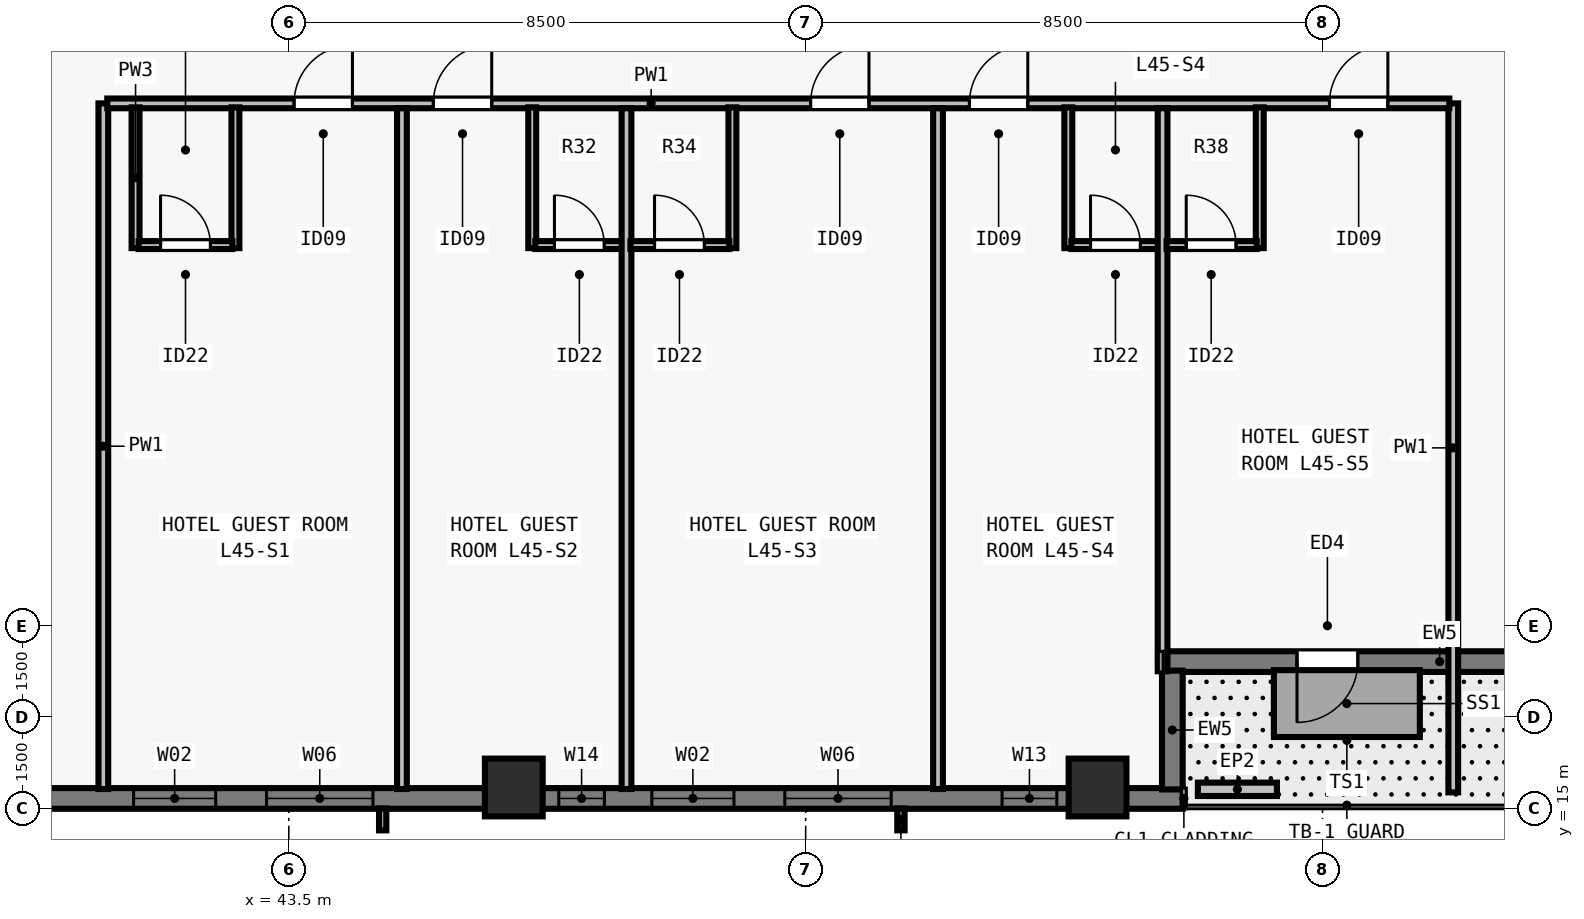
"""IFC4 building model, lengths in metres.
Left out: names, types, materials, properties, quantities, classifications, styles, units other than length and angle.
Written with IfcOpenShell. Run it as: python <this file> out.ifc"""

import sys

from ifc_helpers import new_model, si_unit, direction, frame, frame_2d, origin, origin_2d, place, context, subcontext, project, spatial, rectangle, extrude, element, fill, save


model = new_model("IFC4")
c1 = context("Model", 3, precision=1e-05, world=origin(), true_north=direction((0.0, 1.0)))
c2 = subcontext(c1, "Body", "Model", "MODEL_VIEW")
j1 = project(units=[si_unit("LENGTHUNIT", "METRE"), si_unit("PLANEANGLEUNIT", "RADIAN")], contexts=[c1])
p1 = place(None, origin())
s1 = spatial("IfcSite", under=j1, at=p1, CompositionType="ELEMENT")
p2 = place(p1, origin())
s2 = spatial("IfcBuilding", under=s1, at=p2, CompositionType="ELEMENT")
p3 = place(p2, frame((0.0, 0.0, 165.5)))
s3 = spatial("IfcBuildingStorey", under=s2, at=p3, CompositionType="ELEMENT", Elevation=165.5)
for number, where, z_axis, x_axis in (
    (1, (47.2, 15.35, 0.0), (0.0, 0.0, 1.0), (1.0, 0.0, 0.0)),
    (2, (56.8, 15.35, 0.0), (0.0, 0.0, 1.0), (1.0, 0.0, 0.0)),
):
    element("IfcColumn", number, at=place(p3, frame(where, z_axis=z_axis, x_axis=x_axis)), inside=s3, PredefinedType="COLUMN", context=c2, shape_type="SweptSolid", body=[
        extrude(rectangle(XDim=0.95, YDim=0.95, at=origin_2d()), origin(), (0.0, 0.0, 1.0), 3.5),
    ])
p4 = place(p3, frame((58.2, 15.17, 0.0), z_axis=(0.0, 0.0, 1.0), x_axis=(-1.0, 0.0, 0.0)))
e3 = element("IfcWall", 3, at=p4, inside=s3, PredefinedType="SOLIDWALL", context=c2, shape_type="SweptSolid", body=[
    extrude(rectangle(XDim=25.882, YDim=0.34, at=frame_2d((12.941, 0.0))), origin(), (0.0, 0.0, 1.0), 3.28),
])
p5 = place(p4, frame((4.793, 0.0, 0.8)))
e4 = element("IfcOpeningElement", 4, at=p5, cuts=e3, PredefinedType="OPENING", context=c2, shape_type="SweptSolid", body=[
    extrude(rectangle(XDim=1.75, YDim=1.66, at=frame_2d((0.875, 0.83))), frame((0.0, 0.18, 0.0), z_axis=(0.0, -1.0, 0.0), x_axis=(1.0, 0.0, 0.0)), (0.0, 0.0, 1.0), 0.36),
])
p6 = place(p4, frame((7.38, 0.0, 0.8)))
e5 = element("IfcOpeningElement", 5, at=p6, cuts=e3, PredefinedType="OPENING", context=c2, shape_type="SweptSolid", body=[
    extrude(rectangle(XDim=1.35, YDim=1.66, at=frame_2d((0.675, 0.83))), frame((0.0, 0.18, 0.0), z_axis=(0.0, -1.0, 0.0), x_axis=(1.0, 0.0, 0.0)), (0.0, 0.0, 1.0), 0.36),
])
p7 = place(p4, frame((13.316, 0.0, 0.8)))
e6 = element("IfcOpeningElement", 6, at=p7, cuts=e3, PredefinedType="OPENING", context=c2, shape_type="SweptSolid", body=[
    extrude(rectangle(XDim=1.75, YDim=1.66, at=frame_2d((0.875, 0.83))), frame((0.0, 0.18, 0.0), z_axis=(0.0, -1.0, 0.0), x_axis=(1.0, 0.0, 0.0)), (0.0, 0.0, 1.0), 0.36),
])
p8 = place(p4, frame((15.902, 0.0, 0.8)))
e7 = element("IfcOpeningElement", 7, at=p8, cuts=e3, PredefinedType="OPENING", context=c2, shape_type="SweptSolid", body=[
    extrude(rectangle(XDim=1.35, YDim=1.66, at=frame_2d((0.675, 0.83))), frame((0.0, 0.18, 0.0), z_axis=(0.0, -1.0, 0.0), x_axis=(1.0, 0.0, 0.0)), (0.0, 0.0, 1.0), 0.36),
])
p9 = place(p4, frame((9.51, 0.0, 0.8)))
e8 = element("IfcOpeningElement", 8, at=p9, cuts=e3, PredefinedType="OPENING", context=c2, shape_type="SweptSolid", body=[
    extrude(rectangle(XDim=0.75, YDim=1.66, at=frame_2d((0.375, 0.83))), frame((0.0, 0.18, 0.0), z_axis=(0.0, -1.0, 0.0), x_axis=(1.0, 0.0, 0.0)), (0.0, 0.0, 1.0), 0.36),
])
p10 = place(p4, frame((2.07, 0.0, 0.8)))
e9 = element("IfcOpeningElement", 9, at=p10, cuts=e3, PredefinedType="OPENING", context=c2, shape_type="SweptSolid", body=[
    extrude(rectangle(XDim=0.9, YDim=1.66, at=frame_2d((0.45, 0.83))), frame((0.0, 0.18, 0.0), z_axis=(0.0, -1.0, 0.0), x_axis=(1.0, 0.0, 0.0)), (0.0, 0.0, 1.0), 0.36),
])
p11 = place(p3, frame((63.622, 17.42, 0.0), z_axis=(0.0, 0.0, 1.0), x_axis=(-1.0, 0.0, 0.0)))
e10 = element("IfcWall", 10, at=p11, inside=s3, PredefinedType="SOLIDWALL", context=c2, shape_type="SweptSolid", body=[
    extrude(rectangle(XDim=5.762, YDim=0.34, at=frame_2d((2.881, 0.0))), origin(), (0.0, 0.0, 1.0), 3.28),
])
p12 = place(p11, frame((2.542, 0.0, 0.0)))
e11 = element("IfcOpeningElement", 11, at=p12, cuts=e10, PredefinedType="OPENING", context=c2, shape_type="SweptSolid", body=[
    extrude(rectangle(XDim=1.0, YDim=2.15, at=frame_2d((0.5, 1.075))), frame((0.0, 0.18, 0.0), z_axis=(0.0, -1.0, 0.0), x_axis=(1.0, 0.0, 0.0)), (0.0, 0.0, 1.0), 0.36),
])
p13 = place(p3, frame((58.03, 17.272, 0.0), z_axis=(0.0, 0.0, 1.0), x_axis=(0.0, -1.0, 0.0)))
e12 = element("IfcWall", 12, at=p13, inside=s3, PredefinedType="SOLIDWALL", context=c2, shape_type="SweptSolid", body=[
    extrude(rectangle(XDim=1.954, YDim=0.34, at=frame_2d((0.977, 0.0))), origin(), (0.0, 0.0, 1.0), 3.28),
])
p14 = place(p3, frame((58.45, 15.32, 0.0), z_axis=(0.0, 0.0, 1.0), x_axis=(1.0, 0.0, 0.0)))
e13 = element("IfcWall", 13, at=p14, inside=s3, PredefinedType="PARAPET", context=c2, shape_type="SweptSolid", body=[
    extrude(rectangle(XDim=1.3, YDim=0.22, at=frame_2d((0.65, 0.0))), origin(), (0.0, 0.0, 1.0), 0.55),
])
p15 = place(p3, frame((40.45, 15.325, 0.0), z_axis=(0.0, 0.0, 1.0), x_axis=(0.0, 1.0, 0.0)))
e14 = element("IfcWall", 14, at=p15, inside=s3, PredefinedType="PARTITIONING", context=c2, shape_type="SweptSolid", body=[
    extrude(rectangle(XDim=11.275, YDim=0.16, at=frame_2d((5.638, 0.0))), origin(), (0.0, 0.0, 1.0), 2.555),
])
p16 = place(p3, frame((62.65, 15.27, 0.0), z_axis=(0.0, 0.0, 1.0), x_axis=(0.0, 1.0, 0.0)))
e15 = element("IfcWall", 15, at=p16, inside=s3, PredefinedType="PARTITIONING", context=c2, shape_type="SweptSolid", body=[
    extrude(rectangle(XDim=11.33, YDim=0.16, at=frame_2d((5.665, 0.0))), origin(), (0.0, 0.0, 1.0), 3.28),
])
p17 = place(p3, frame((40.515, 26.6, 0.0), z_axis=(0.0, 0.0, 1.0), x_axis=(1.0, 0.0, 0.0)))
e16 = element("IfcWall", 16, at=p17, inside=s3, PredefinedType="PARTITIONING", context=c2, shape_type="SweptSolid", body=[
    extrude(rectangle(XDim=22.07, YDim=0.16, at=frame_2d((11.035, 0.0))), origin(), (0.0, 0.0, 1.0), 3.28),
])
p18 = place(p17, frame((3.072, 0.0, 0.0)))
e17 = element("IfcOpeningElement", 17, at=p18, cuts=e16, PredefinedType="OPENING", context=c2, shape_type="SweptSolid", body=[
    extrude(rectangle(XDim=0.96, YDim=2.15, at=frame_2d((0.48, 1.075))), frame((0.0, 0.09, 0.0), z_axis=(0.0, -1.0, 0.0), x_axis=(1.0, 0.0, 0.0)), (0.0, 0.0, 1.0), 0.18),
])
p19 = place(p17, frame((5.362, 0.0, 0.0)))
e18 = element("IfcOpeningElement", 18, at=p19, cuts=e16, PredefinedType="OPENING", context=c2, shape_type="SweptSolid", body=[
    extrude(rectangle(XDim=0.96, YDim=2.15, at=frame_2d((0.48, 1.075))), frame((0.0, 0.09, 0.0), z_axis=(0.0, -1.0, 0.0), x_axis=(1.0, 0.0, 0.0)), (0.0, 0.0, 1.0), 0.18),
])
p20 = place(p17, frame((11.566, 0.0, 0.0)))
e19 = element("IfcOpeningElement", 19, at=p20, cuts=e16, PredefinedType="OPENING", context=c2, shape_type="SweptSolid", body=[
    extrude(rectangle(XDim=0.96, YDim=2.15, at=frame_2d((0.48, 1.075))), frame((0.0, 0.09, 0.0), z_axis=(0.0, -1.0, 0.0), x_axis=(1.0, 0.0, 0.0)), (0.0, 0.0, 1.0), 0.18),
])
p21 = place(p17, frame((14.178, 0.0, 0.0)))
e20 = element("IfcOpeningElement", 20, at=p21, cuts=e16, PredefinedType="OPENING", context=c2, shape_type="SweptSolid", body=[
    extrude(rectangle(XDim=0.96, YDim=2.15, at=frame_2d((0.48, 1.075))), frame((0.0, 0.09, 0.0), z_axis=(0.0, -1.0, 0.0), x_axis=(1.0, 0.0, 0.0)), (0.0, 0.0, 1.0), 0.18),
])
p22 = place(p17, frame((20.099, 0.0, 0.0)))
e21 = element("IfcOpeningElement", 21, at=p22, cuts=e16, PredefinedType="OPENING", context=c2, shape_type="SweptSolid", body=[
    extrude(rectangle(XDim=0.96, YDim=2.15, at=frame_2d((0.48, 1.075))), frame((0.0, 0.09, 0.0), z_axis=(0.0, -1.0, 0.0), x_axis=(1.0, 0.0, 0.0)), (0.0, 0.0, 1.0), 0.18),
])
for number, where, z_axis, x_axis in (
    (22, (40.98, 24.22, 0.0), (0.0, 0.0, 1.0), (0.0, 1.0, 0.0)),
    (23, (42.622, 24.22, 0.0), (0.0, 0.0, 1.0), (0.0, 1.0, 0.0)),
):
    element("IfcWall", number, at=place(p3, frame(where, z_axis=z_axis, x_axis=x_axis)), inside=s3, PredefinedType="PLUMBINGWALL", context=c2, shape_type="SweptSolid", body=[
        extrude(rectangle(XDim=2.315, YDim=0.13, at=frame_2d((1.157, 0.0))), origin(), (0.0, 0.0, 1.0), 3.28),
    ])
p23 = place(p3, frame((41.03, 24.27, 0.0), z_axis=(0.0, 0.0, 1.0), x_axis=(1.0, 0.0, 0.0)))
e24 = element("IfcWall", 24, at=p23, inside=s3, PredefinedType="PLUMBINGWALL", context=c2, shape_type="SweptSolid", body=[
    extrude(rectangle(XDim=1.542, YDim=0.13, at=frame_2d((0.771, 0.0))), origin(), (0.0, 0.0, 1.0), 3.28),
])
p24 = place(p23, frame((0.361, 0.0, 0.0)))
e25 = element("IfcOpeningElement", 25, at=p24, cuts=e24, PredefinedType="OPENING", context=c2, shape_type="SweptSolid", body=[
    extrude(rectangle(XDim=0.82, YDim=2.1, at=frame_2d((0.41, 1.05))), frame((0.0, 0.075, 0.0), z_axis=(0.0, -1.0, 0.0), x_axis=(1.0, 0.0, 0.0)), (0.0, 0.0, 1.0), 0.15),
])
p25 = place(p3, frame((45.361, 15.325, 0.0), z_axis=(0.0, 0.0, 1.0), x_axis=(0.0, 1.0, 0.0)))
e26 = element("IfcWall", 26, at=p25, inside=s3, PredefinedType="PARTITIONING", context=c2, shape_type="SweptSolid", body=[
    extrude(rectangle(XDim=11.195, YDim=0.16, at=frame_2d((5.598, 0.0))), origin(), (0.0, 0.0, 1.0), 3.28),
])
p26 = place(p3, frame((47.503, 24.22, 0.0), z_axis=(0.0, 0.0, 1.0), x_axis=(0.0, 1.0, 0.0)))
e27 = element("IfcWall", 27, at=p26, inside=s3, PredefinedType="PLUMBINGWALL", context=c2, shape_type="SweptSolid", body=[
    extrude(rectangle(XDim=2.315, YDim=0.13, at=frame_2d((1.157, 0.0))), origin(), (0.0, 0.0, 1.0), 3.28),
])
p27 = place(p3, frame((47.553, 24.27, 0.0), z_axis=(0.0, 0.0, 1.0), x_axis=(1.0, 0.0, 0.0)))
e28 = element("IfcWall", 28, at=p27, inside=s3, PredefinedType="PLUMBINGWALL", context=c2, shape_type="SweptSolid", body=[
    extrude(rectangle(XDim=1.55, YDim=0.13, at=frame_2d((0.775, 0.0))), origin(), (0.0, 0.0, 1.0), 3.28),
])
p28 = place(p27, frame((0.315, 0.0, 0.0)))
e29 = element("IfcOpeningElement", 29, at=p28, cuts=e28, PredefinedType="OPENING", context=c2, shape_type="SweptSolid", body=[
    extrude(rectangle(XDim=0.82, YDim=2.1, at=frame_2d((0.41, 1.05))), frame((0.0, 0.075, 0.0), z_axis=(0.0, -1.0, 0.0), x_axis=(1.0, 0.0, 0.0)), (0.0, 0.0, 1.0), 0.15),
])
p29 = place(p3, frame((49.053, 15.325, 0.0), z_axis=(0.0, 0.0, 1.0), x_axis=(0.0, 1.0, 0.0)))
e30 = element("IfcWall", 30, at=p29, inside=s3, PredefinedType="PARTITIONING", context=c2, shape_type="SweptSolid", body=[
    extrude(rectangle(XDim=11.195, YDim=0.16, at=frame_2d((5.598, 0.0))), origin(), (0.0, 0.0, 1.0), 2.896),
])
p30 = place(p3, frame((50.795, 24.22, 0.0), z_axis=(0.0, 0.0, 1.0), x_axis=(0.0, 1.0, 0.0)))
e31 = element("IfcWall", 31, at=p30, inside=s3, PredefinedType="PLUMBINGWALL", context=c2, shape_type="SweptSolid", body=[
    extrude(rectangle(XDim=2.315, YDim=0.13, at=frame_2d((1.157, 0.0))), origin(), (0.0, 0.0, 1.0), 3.28),
])
p31 = place(p3, frame((49.118, 24.27, 0.0), z_axis=(0.0, 0.0, 1.0), x_axis=(1.0, 0.0, 0.0)))
e32 = element("IfcWall", 32, at=p31, inside=s3, PredefinedType="PLUMBINGWALL", context=c2, shape_type="SweptSolid", body=[
    extrude(rectangle(XDim=1.627, YDim=0.13, at=frame_2d((0.813, 0.0))), origin(), (0.0, 0.0, 1.0), 3.28),
])
p32 = place(p31, frame((0.396, 0.0, 0.0)))
e33 = element("IfcOpeningElement", 33, at=p32, cuts=e32, PredefinedType="OPENING", context=c2, shape_type="SweptSolid", body=[
    extrude(rectangle(XDim=0.82, YDim=2.1, at=frame_2d((0.41, 1.05))), frame((0.0, 0.075, 0.0), z_axis=(0.0, -1.0, 0.0), x_axis=(1.0, 0.0, 0.0)), (0.0, 0.0, 1.0), 0.15),
])
p33 = place(p3, frame((54.177, 15.325, 0.0), z_axis=(0.0, 0.0, 1.0), x_axis=(0.0, 1.0, 0.0)))
e34 = element("IfcWall", 34, at=p33, inside=s3, PredefinedType="PARTITIONING", context=c2, shape_type="SweptSolid", body=[
    extrude(rectangle(XDim=11.195, YDim=0.16, at=frame_2d((5.598, 0.0))), origin(), (0.0, 0.0, 1.0), 2.896),
])
p34 = place(p3, frame((56.32, 24.22, 0.0), z_axis=(0.0, 0.0, 1.0), x_axis=(0.0, 1.0, 0.0)))
e35 = element("IfcWall", 35, at=p34, inside=s3, PredefinedType="PLUMBINGWALL", context=c2, shape_type="SweptSolid", body=[
    extrude(rectangle(XDim=2.315, YDim=0.13, at=frame_2d((1.157, 0.0))), origin(), (0.0, 0.0, 1.0), 3.28),
])
p35 = place(p3, frame((56.369, 24.27, 0.0), z_axis=(0.0, 0.0, 1.0), x_axis=(1.0, 0.0, 0.0)))
e36 = element("IfcWall", 36, at=p35, inside=s3, PredefinedType="PLUMBINGWALL", context=c2, shape_type="SweptSolid", body=[
    extrude(rectangle(XDim=1.55, YDim=0.13, at=frame_2d((0.775, 0.0))), origin(), (0.0, 0.0, 1.0), 3.28),
])
p36 = place(p35, frame((0.315, 0.0, 0.0)))
e37 = element("IfcOpeningElement", 37, at=p36, cuts=e36, PredefinedType="OPENING", context=c2, shape_type="SweptSolid", body=[
    extrude(rectangle(XDim=0.82, YDim=2.1, at=frame_2d((0.41, 1.05))), frame((0.0, 0.075, 0.0), z_axis=(0.0, -1.0, 0.0), x_axis=(1.0, 0.0, 0.0)), (0.0, 0.0, 1.0), 0.15),
])
p37 = place(p3, frame((57.869, 17.262, 0.0), z_axis=(0.0, 0.0, 1.0), x_axis=(0.0, 1.0, 0.0)))
e38 = element("IfcWall", 38, at=p37, inside=s3, PredefinedType="PARTITIONING", context=c2, shape_type="SweptSolid", body=[
    extrude(rectangle(XDim=9.258, YDim=0.16, at=frame_2d((4.629, 0.0))), origin(), (0.0, 0.0, 1.0), 3.28),
])
p38 = place(p3, frame((59.468, 24.22, 0.0), z_axis=(0.0, 0.0, 1.0), x_axis=(0.0, 1.0, 0.0)))
e39 = element("IfcWall", 39, at=p38, inside=s3, PredefinedType="PLUMBINGWALL", context=c2, shape_type="SweptSolid", body=[
    extrude(rectangle(XDim=2.315, YDim=0.13, at=frame_2d((1.157, 0.0))), origin(), (0.0, 0.0, 1.0), 3.28),
])
p39 = place(p3, frame((57.935, 24.27, 0.0), z_axis=(0.0, 0.0, 1.0), x_axis=(1.0, 0.0, 0.0)))
e40 = element("IfcWall", 40, at=p39, inside=s3, PredefinedType="PLUMBINGWALL", context=c2, shape_type="SweptSolid", body=[
    extrude(rectangle(XDim=1.483, YDim=0.13, at=frame_2d((0.742, 0.0))), origin(), (0.0, 0.0, 1.0), 3.28),
])
p40 = place(p39, frame((0.324, 0.0, 0.0)))
e41 = element("IfcOpeningElement", 41, at=p40, cuts=e40, PredefinedType="OPENING", context=c2, shape_type="SweptSolid", body=[
    extrude(rectangle(XDim=0.82, YDim=2.1, at=frame_2d((0.41, 1.05))), frame((0.0, 0.075, 0.0), z_axis=(0.0, -1.0, 0.0), x_axis=(1.0, 0.0, 0.0)), (0.0, 0.0, 1.0), 0.15),
])
p41 = place(p5, origin())
e42 = element("IfcWindow", 42, at=p41, inside=s3, PartitioningType="SINGLE_PANEL", PredefinedType="WINDOW", context=c2, shape_type="SweptSolid", body=[
    extrude(rectangle(XDim=1.75, YDim=1.66, at=frame_2d((0.875, 0.83))), frame((0.0, -0.05, 0.0), z_axis=(0.0, -1.0, 0.0), x_axis=(1.0, 0.0, 0.0)), (0.0, 0.0, 1.0), 0.06),
])
fill(e4, e42)
p42 = place(p6, origin())
e43 = element("IfcWindow", 43, at=p42, inside=s3, PartitioningType="SINGLE_PANEL", PredefinedType="WINDOW", context=c2, shape_type="SweptSolid", body=[
    extrude(rectangle(XDim=1.35, YDim=1.66, at=frame_2d((0.675, 0.83))), frame((0.0, -0.05, 0.0), z_axis=(0.0, -1.0, 0.0), x_axis=(1.0, 0.0, 0.0)), (0.0, 0.0, 1.0), 0.06),
])
fill(e5, e43)
p43 = place(p7, origin())
e44 = element("IfcWindow", 44, at=p43, inside=s3, PartitioningType="SINGLE_PANEL", PredefinedType="WINDOW", context=c2, shape_type="SweptSolid", body=[
    extrude(rectangle(XDim=1.75, YDim=1.66, at=frame_2d((0.875, 0.83))), frame((0.0, -0.05, 0.0), z_axis=(0.0, -1.0, 0.0), x_axis=(1.0, 0.0, 0.0)), (0.0, 0.0, 1.0), 0.06),
])
fill(e6, e44)
p44 = place(p8, origin())
e45 = element("IfcWindow", 45, at=p44, inside=s3, PartitioningType="SINGLE_PANEL", PredefinedType="WINDOW", context=c2, shape_type="SweptSolid", body=[
    extrude(rectangle(XDim=1.35, YDim=1.66, at=frame_2d((0.675, 0.83))), frame((0.0, -0.05, 0.0), z_axis=(0.0, -1.0, 0.0), x_axis=(1.0, 0.0, 0.0)), (0.0, 0.0, 1.0), 0.06),
])
fill(e7, e45)
p45 = place(p12, origin())
e46 = element("IfcDoor", 46, at=p45, inside=s3, OperationType="SINGLE_SWING_RIGHT", PredefinedType="DOOR", context=c2, shape_type="SweptSolid", body=[
    extrude(rectangle(XDim=1.0, YDim=2.15, at=frame_2d((0.5, 1.075))), frame((0.0, 0.025, 0.0), z_axis=(0.0, -1.0, 0.0), x_axis=(1.0, 0.0, 0.0)), (0.0, 0.0, 1.0), 0.05),
])
fill(e11, e46)
p46 = place(p9, origin())
e47 = element("IfcWindow", 47, at=p46, inside=s3, PartitioningType="SINGLE_PANEL", PredefinedType="WINDOW", context=c2, shape_type="SweptSolid", body=[
    extrude(rectangle(XDim=0.75, YDim=1.66, at=frame_2d((0.375, 0.83))), frame((0.0, -0.04, 0.0), z_axis=(0.0, -1.0, 0.0), x_axis=(1.0, 0.0, 0.0)), (0.0, 0.0, 1.0), 0.06),
])
fill(e8, e47)
p47 = place(p10, origin())
e48 = element("IfcWindow", 48, at=p47, inside=s3, PartitioningType="SINGLE_PANEL", PredefinedType="WINDOW", context=c2, shape_type="SweptSolid", body=[
    extrude(rectangle(XDim=0.9, YDim=1.66, at=frame_2d((0.45, 0.83))), frame((0.0, -0.04, 0.0), z_axis=(0.0, -1.0, 0.0), x_axis=(1.0, 0.0, 0.0)), (0.0, 0.0, 1.0), 0.06),
])
fill(e9, e48)
p48 = place(p24, origin())
e49 = element("IfcDoor", 49, at=p48, inside=s3, OperationType="SINGLE_SWING_LEFT", PredefinedType="DOOR", context=c2, shape_type="SweptSolid", body=[
    extrude(rectangle(XDim=0.82, YDim=2.1, at=frame_2d((0.41, 1.05))), frame((0.0, 0.025, 0.0), z_axis=(0.0, -1.0, 0.0), x_axis=(1.0, 0.0, 0.0)), (0.0, 0.0, 1.0), 0.05),
])
fill(e25, e49)
p49 = place(p18, origin())
e50 = element("IfcDoor", 50, at=p49, inside=s3, OperationType="SINGLE_SWING_RIGHT", PredefinedType="DOOR", context=c2, shape_type="SweptSolid", body=[
    extrude(rectangle(XDim=0.96, YDim=2.15, at=frame_2d((0.48, 1.075))), frame((0.0, 0.025, 0.0), z_axis=(0.0, -1.0, 0.0), x_axis=(1.0, 0.0, 0.0)), (0.0, 0.0, 1.0), 0.05),
])
fill(e17, e50)
p50 = place(p28, origin())
e51 = element("IfcDoor", 51, at=p50, inside=s3, OperationType="SINGLE_SWING_LEFT", PredefinedType="DOOR", context=c2, shape_type="SweptSolid", body=[
    extrude(rectangle(XDim=0.82, YDim=2.1, at=frame_2d((0.41, 1.05))), frame((0.0, 0.025, 0.0), z_axis=(0.0, -1.0, 0.0), x_axis=(1.0, 0.0, 0.0)), (0.0, 0.0, 1.0), 0.05),
])
fill(e29, e51)
p51 = place(p19, origin())
e52 = element("IfcDoor", 52, at=p51, inside=s3, OperationType="SINGLE_SWING_RIGHT", PredefinedType="DOOR", context=c2, shape_type="SweptSolid", body=[
    extrude(rectangle(XDim=0.96, YDim=2.15, at=frame_2d((0.48, 1.075))), frame((0.0, 0.025, 0.0), z_axis=(0.0, -1.0, 0.0), x_axis=(1.0, 0.0, 0.0)), (0.0, 0.0, 1.0), 0.05),
])
fill(e18, e52)
p52 = place(p32, origin())
e53 = element("IfcDoor", 53, at=p52, inside=s3, OperationType="SINGLE_SWING_LEFT", PredefinedType="DOOR", context=c2, shape_type="SweptSolid", body=[
    extrude(rectangle(XDim=0.82, YDim=2.1, at=frame_2d((0.41, 1.05))), frame((0.0, 0.025, 0.0), z_axis=(0.0, -1.0, 0.0), x_axis=(1.0, 0.0, 0.0)), (0.0, 0.0, 1.0), 0.05),
])
fill(e33, e53)
p53 = place(p20, origin())
e54 = element("IfcDoor", 54, at=p53, inside=s3, OperationType="SINGLE_SWING_RIGHT", PredefinedType="DOOR", context=c2, shape_type="SweptSolid", body=[
    extrude(rectangle(XDim=0.96, YDim=2.15, at=frame_2d((0.48, 1.075))), frame((0.0, 0.025, 0.0), z_axis=(0.0, -1.0, 0.0), x_axis=(1.0, 0.0, 0.0)), (0.0, 0.0, 1.0), 0.05),
])
fill(e19, e54)
p54 = place(p36, origin())
e55 = element("IfcDoor", 55, at=p54, inside=s3, OperationType="SINGLE_SWING_LEFT", PredefinedType="DOOR", context=c2, shape_type="SweptSolid", body=[
    extrude(rectangle(XDim=0.82, YDim=2.1, at=frame_2d((0.41, 1.05))), frame((0.0, 0.025, 0.0), z_axis=(0.0, -1.0, 0.0), x_axis=(1.0, 0.0, 0.0)), (0.0, 0.0, 1.0), 0.05),
])
fill(e37, e55)
p55 = place(p21, origin())
e56 = element("IfcDoor", 56, at=p55, inside=s3, OperationType="SINGLE_SWING_RIGHT", PredefinedType="DOOR", context=c2, shape_type="SweptSolid", body=[
    extrude(rectangle(XDim=0.96, YDim=2.15, at=frame_2d((0.48, 1.075))), frame((0.0, 0.025, 0.0), z_axis=(0.0, -1.0, 0.0), x_axis=(1.0, 0.0, 0.0)), (0.0, 0.0, 1.0), 0.05),
])
fill(e20, e56)
p56 = place(p40, origin())
e57 = element("IfcDoor", 57, at=p56, inside=s3, OperationType="SINGLE_SWING_LEFT", PredefinedType="DOOR", context=c2, shape_type="SweptSolid", body=[
    extrude(rectangle(XDim=0.82, YDim=2.1, at=frame_2d((0.41, 1.05))), frame((0.0, 0.025, 0.0), z_axis=(0.0, -1.0, 0.0), x_axis=(1.0, 0.0, 0.0)), (0.0, 0.0, 1.0), 0.05),
])
fill(e41, e57)
p57 = place(p22, origin())
e58 = element("IfcDoor", 58, at=p57, inside=s3, OperationType="SINGLE_SWING_RIGHT", PredefinedType="DOOR", context=c2, shape_type="SweptSolid", body=[
    extrude(rectangle(XDim=0.96, YDim=2.15, at=frame_2d((0.48, 1.075))), frame((0.0, 0.025, 0.0), z_axis=(0.0, -1.0, 0.0), x_axis=(1.0, 0.0, 0.0)), (0.0, 0.0, 1.0), 0.05),
])
fill(e21, e58)
save(model, sys.argv[1])
